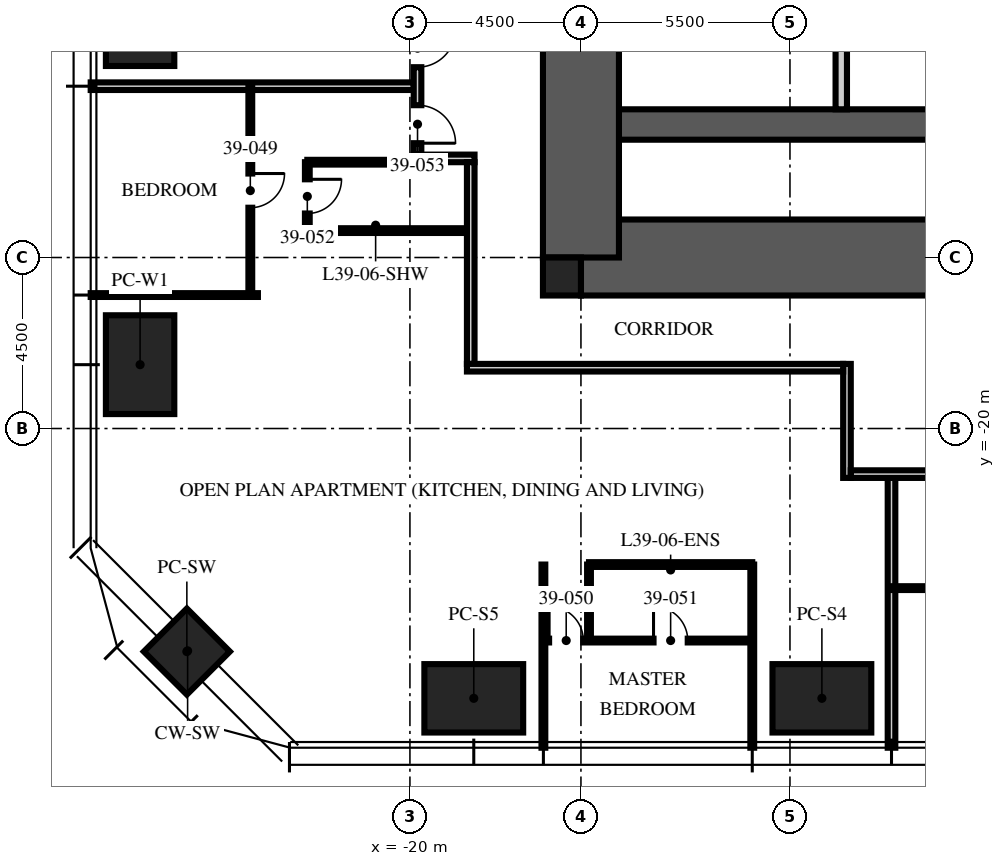
"""IFC4 building model, lengths in metres.
Left out: names, types, materials, properties, quantities, classifications, styles, units other than length and angle.
Written with IfcOpenShell. Run it as: python <this file> out.ifc"""

import sys

from ifc_helpers import new_model, si_unit, direction, frame, frame_2d, origin, origin_2d, place, context, subcontext, project, spatial, rectangle, extrude, element, fill, save


model = new_model("IFC4")
c1 = context("Model", 3, precision=1e-05, world=origin(), true_north=direction((0.0, 1.0)))
c2 = subcontext(c1, "Body", "Model", "MODEL_VIEW")
j1 = project(units=[si_unit("LENGTHUNIT", "METRE"), si_unit("PLANEANGLEUNIT", "RADIAN")], contexts=[c1])
p1 = place(None, origin())
s1 = spatial("IfcSite", under=j1, at=p1, CompositionType="ELEMENT")
p2 = place(p1, origin())
s2 = spatial("IfcBuilding", under=s1, at=p2, CompositionType="ELEMENT")
p3 = place(p2, frame((0.0, 0.0, 156.0)))
s3 = spatial("IfcBuildingStorey", under=s2, at=p3, CompositionType="ELEMENT", Elevation=156.0)
p4 = place(p3, frame((-15.5, -15.5, -0.25), z_axis=(0.0, 0.0, 1.0), x_axis=(1.0, 0.0, 0.0)))
e1 = element("IfcWall", 1, at=p4, inside=s3, PredefinedType="SHEAR", context=c2, shape_type="SweptSolid", body=[
    extrude(rectangle(XDim=31.0, YDim=2.0, at=frame_2d((15.5, 0.0))), origin(), (0.0, 0.0, 1.0), 3.75),
])
p5 = place(p4, frame((10.4, 0.0, 0.25)))
e2 = element("IfcOpeningElement", 2, at=p5, cuts=e1, PredefinedType="OPENING", context=c2, shape_type="SweptSolid", body=[
    extrude(rectangle(XDim=1.1, YDim=2.1, at=frame_2d((0.55, 1.05))), frame((0.0, 1.01, 0.0), z_axis=(0.0, -1.0, 0.0), x_axis=(1.0, 0.0, 0.0)), (0.0, 0.0, 1.0), 2.02),
])
p6 = place(p4, frame((13.5, 0.0, 0.25)))
e3 = element("IfcOpeningElement", 3, at=p6, cuts=e1, PredefinedType="OPENING", context=c2, shape_type="SweptSolid", body=[
    extrude(rectangle(XDim=1.1, YDim=2.1, at=frame_2d((0.55, 1.05))), frame((0.0, 1.01, 0.0), z_axis=(0.0, -1.0, 0.0), x_axis=(1.0, 0.0, 0.0)), (0.0, 0.0, 1.0), 2.02),
])
p7 = place(p4, frame((16.6, 0.0, 0.25)))
e4 = element("IfcOpeningElement", 4, at=p7, cuts=e1, PredefinedType="OPENING", context=c2, shape_type="SweptSolid", body=[
    extrude(rectangle(XDim=1.1, YDim=2.1, at=frame_2d((0.55, 1.05))), frame((0.0, 1.01, 0.0), z_axis=(0.0, -1.0, 0.0), x_axis=(1.0, 0.0, 0.0)), (0.0, 0.0, 1.0), 2.02),
])
p8 = place(p3, frame((-15.5, -12.0, -0.25), z_axis=(0.0, 0.0, 1.0), x_axis=(1.0, 0.0, 0.0)))
e5 = element("IfcWall", 5, at=p8, inside=s3, PredefinedType="SHEAR", context=c2, shape_type="SweptSolid", body=[
    extrude(rectangle(XDim=31.0, YDim=0.8, at=frame_2d((15.5, 0.0))), origin(), (0.0, 0.0, 1.0), 3.75),
])
p9 = place(p3, frame((-15.5, -15.5, -0.25), z_axis=(0.0, 0.0, 1.0), x_axis=(0.0, 1.0, 0.0)))
e6 = element("IfcWall", 6, at=p9, inside=s3, PredefinedType="SHEAR", context=c2, shape_type="SweptSolid", body=[
    extrude(rectangle(XDim=31.0, YDim=2.0, at=frame_2d((15.5, 0.0))), origin(), (0.0, 0.0, 1.0), 3.75),
])
p10 = place(p9, frame((6.5, 0.0, 0.25)))
e7 = element("IfcOpeningElement", 7, at=p10, cuts=e6, PredefinedType="OPENING", context=c2, shape_type="SweptSolid", body=[
    extrude(rectangle(XDim=1.2, YDim=2.1, at=frame_2d((0.6, 1.05))), frame((0.0, 1.01, 0.0), z_axis=(0.0, -1.0, 0.0), x_axis=(1.0, 0.0, 0.0)), (0.0, 0.0, 1.0), 2.02),
])
p11 = place(p9, frame((23.0, 0.0, 0.25)))
e8 = element("IfcOpeningElement", 8, at=p11, cuts=e6, PredefinedType="OPENING", context=c2, shape_type="SweptSolid", body=[
    extrude(rectangle(XDim=1.8, YDim=2.1, at=frame_2d((0.9, 1.05))), frame((0.0, 1.01, 0.0), z_axis=(0.0, -1.0, 0.0), x_axis=(1.0, 0.0, 0.0)), (0.0, 0.0, 1.0), 2.02),
])
p12 = place(p3, frame((-16.0, -16.0, -0.25), z_axis=(0.0, 0.0, 1.0), x_axis=(1.0, 0.0, 0.0)))
e9 = element("IfcColumn", 9, at=p12, inside=s3, PredefinedType="COLUMN", context=c2, shape_type="SweptSolid", body=[
    extrude(rectangle(XDim=1.0, YDim=1.0, at=origin_2d()), origin(), (0.0, 0.0, 1.0), 3.75),
])
for number, where, z_axis, x_axis in (
    (10, (-9.16, -27.1, 0.0), (0.0, 0.0, 1.0), (1.0, 0.0, 0.0)),
    (11, (-18.32, -27.1, 0.0), (0.0, 0.0, 1.0), (1.0, 0.0, 0.0)),
    (12, (-27.1, -18.32, 0.0), (0.0, 0.0, 1.0), (0.0, 1.0, 0.0)),
    (13, (-27.1, -9.16, 0.0), (0.0, 0.0, 1.0), (0.0, 1.0, 0.0)),
):
    element("IfcColumn", number, at=place(p3, frame(where, z_axis=z_axis, x_axis=x_axis)), inside=s3, PredefinedType="COLUMN", context=c2, shape_type="SweptSolid", body=[
        extrude(rectangle(XDim=2.6, YDim=1.8, at=origin_2d()), origin(), (0.0, 0.0, 1.0), 3.75),
    ])
p13 = place(p3, frame((-25.87, -25.87, 0.0), z_axis=(0.0, 0.0, 1.0), x_axis=(0.707106781187, -0.707106781187, 0.0)))
e14 = element("IfcColumn", 14, at=p13, inside=s3, PredefinedType="COLUMN", context=c2, shape_type="SweptSolid", body=[
    extrude(rectangle(XDim=1.6, YDim=1.6, at=origin_2d()), origin(), (0.0, 0.0, 1.0), 3.75),
])
p14 = place(p3, frame((-8.65, -11.6, 0.0), z_axis=(0.0, 0.0, 1.0), x_axis=(0.0, 1.0, 0.0)))
e15 = element("IfcWall", 15, at=p14, inside=s3, PredefinedType="PARTITIONING", context=c2, shape_type="SweptSolid", body=[
    extrude(rectangle(XDim=6.7, YDim=0.3, at=frame_2d((3.35, 0.0))), origin(), (0.0, 0.0, 1.0), 3.5),
])
p15 = place(p14, frame((2.85, 0.0, 0.0)))
e16 = element("IfcOpeningElement", 16, at=p15, cuts=e15, PredefinedType="OPENING", context=c2, shape_type="SweptSolid", body=[
    extrude(rectangle(XDim=1.1, YDim=2.1, at=frame_2d((0.55, 1.05))), frame((0.0, 0.16, 0.0), z_axis=(0.0, -1.0, 0.0), x_axis=(1.0, 0.0, 0.0)), (0.0, 0.0, 1.0), 0.32),
])
p16 = place(p3, frame((-19.9, -10.992, 0.0), z_axis=(0.0, 0.0, 1.0), x_axis=(-1.0, 0.0, 0.0)))
e17 = element("IfcWall", 17, at=p16, inside=s3, PredefinedType="PARTITIONING", context=c2, shape_type="SweptSolid", body=[
    extrude(rectangle(XDim=8.5, YDim=0.2, at=frame_2d((4.25, 0.0))), origin(), (0.0, 0.0, 1.0), 2.81),
])
p17 = place(p3, frame((-24.0, -16.488, 0.0), z_axis=(0.0, 0.0, 1.0), x_axis=(-1.0, 0.0, 0.0)))
e18 = element("IfcWall", 18, at=p17, inside=s3, PredefinedType="PARTITIONING", context=c2, shape_type="SweptSolid", body=[
    extrude(rectangle(XDim=4.4, YDim=0.1, at=frame_2d((2.2, 0.0))), origin(), (0.0, 0.0, 1.0), 2.81),
])
for number, where, z_axis, x_axis in (
    (19, (-16.488, -23.58, 0.0), (0.0, 0.0, 1.0), (0.0, -1.0, 0.0)),
    (20, (-10.992, -23.58, 0.0), (0.0, 0.0, 1.0), (0.0, -1.0, 0.0)),
):
    element("IfcWall", number, at=place(p3, frame(where, z_axis=z_axis, x_axis=x_axis)), inside=s3, PredefinedType="PARTITIONING", context=c2, shape_type="SweptSolid", body=[
        extrude(rectangle(XDim=4.82, YDim=0.1, at=frame_2d((2.41, 0.0))), origin(), (0.0, 0.0, 1.0), 2.81),
    ])
p18 = place(p3, frame((-7.328, -21.3, 0.0), z_axis=(0.0, 0.0, 1.0), x_axis=(0.0, -1.0, 0.0)))
e21 = element("IfcWall", 21, at=p18, inside=s3, PredefinedType="PARTITIONING", context=c2, shape_type="SweptSolid", body=[
    extrude(rectangle(XDim=7.1, YDim=0.2, at=frame_2d((3.55, 0.0))), origin(), (0.0, 0.0, 1.0), 2.81),
])
p19 = place(p3, frame((-24.2, -10.992, 0.0), z_axis=(0.0, 0.0, 1.0), x_axis=(0.0, -1.0, 0.0)))
e22 = element("IfcWall", 22, at=p19, inside=s3, PredefinedType="PARTITIONING", context=c2, shape_type="SweptSolid", body=[
    extrude(rectangle(XDim=5.496, YDim=0.1, at=frame_2d((2.748, 0.0))), origin(), (0.0, 0.0, 1.0), 2.81),
])
p20 = place(p19, frame((2.298, 0.0, 0.0)))
e23 = element("IfcOpeningElement", 23, at=p20, cuts=e22, PredefinedType="OPENING", context=c2, shape_type="SweptSolid", body=[
    extrude(rectangle(XDim=0.9, YDim=2.1, at=frame_2d((0.45, 1.05))), frame((0.0, 0.06, 0.0), z_axis=(0.0, -1.0, 0.0), x_axis=(1.0, 0.0, 0.0)), (0.0, 0.0, 1.0), 0.12),
])
p21 = place(p3, frame((-16.488, -25.58, 0.0), z_axis=(0.0, 0.0, 1.0), x_axis=(1.0, 0.0, 0.0)))
e24 = element("IfcWall", 24, at=p21, inside=s3, PredefinedType="PARTITIONING", context=c2, shape_type="SweptSolid", body=[
    extrude(rectangle(XDim=5.496, YDim=0.1, at=frame_2d((2.748, 0.0))), origin(), (0.0, 0.0, 1.0), 2.81),
])
p22 = place(p21, frame((0.15, 0.0, 0.0)))
e25 = element("IfcOpeningElement", 25, at=p22, cuts=e24, PredefinedType="OPENING", context=c2, shape_type="SweptSolid", body=[
    extrude(rectangle(XDim=0.9, YDim=2.1, at=frame_2d((0.45, 1.05))), frame((0.0, 0.06, 0.0), z_axis=(0.0, -1.0, 0.0), x_axis=(1.0, 0.0, 0.0)), (0.0, 0.0, 1.0), 0.12),
])
p23 = place(p21, frame((2.898, 0.0, 0.0)))
e26 = element("IfcOpeningElement", 26, at=p23, cuts=e24, PredefinedType="OPENING", context=c2, shape_type="SweptSolid", body=[
    extrude(rectangle(XDim=0.9, YDim=2.1, at=frame_2d((0.45, 1.05))), frame((0.0, 0.06, 0.0), z_axis=(0.0, -1.0, 0.0), x_axis=(1.0, 0.0, 0.0)), (0.0, 0.0, 1.0), 0.12),
])
p24 = place(p3, frame((-15.288, -23.58, 0.0), z_axis=(0.0, 0.0, 1.0), x_axis=(0.0, -1.0, 0.0)))
e27 = element("IfcWall", 27, at=p24, inside=s3, PredefinedType="PARTITIONING", context=c2, shape_type="SweptSolid", body=[
    extrude(rectangle(XDim=2.0, YDim=0.1, at=frame_2d((1.0, 0.0))), origin(), (0.0, 0.0, 1.0), 3.5),
])
p25 = place(p3, frame((-15.288, -23.58, 0.0), z_axis=(0.0, 0.0, 1.0), x_axis=(1.0, 0.0, 0.0)))
e28 = element("IfcWall", 28, at=p25, inside=s3, PredefinedType="PARTITIONING", context=c2, shape_type="SweptSolid", body=[
    extrude(rectangle(XDim=4.296, YDim=0.125, at=frame_2d((2.148, 0.0))), origin(), (0.0, 0.0, 1.0), 2.81),
])
p26 = place(p3, frame((-22.7, -12.992, 0.0), z_axis=(0.0, 0.0, 1.0), x_axis=(0.0, -1.0, 0.0)))
e29 = element("IfcWall", 29, at=p26, inside=s3, PredefinedType="PARTITIONING", context=c2, shape_type="SweptSolid", body=[
    extrude(rectangle(XDim=1.8, YDim=0.125, at=frame_2d((0.9, 0.0))), origin(), (0.0, 0.0, 1.0), 2.81),
])
p27 = place(p26, frame((0.45, 0.0, 0.0)))
e30 = element("IfcOpeningElement", 30, at=p27, cuts=e29, PredefinedType="OPENING", context=c2, shape_type="SweptSolid", body=[
    extrude(rectangle(XDim=0.9, YDim=2.1, at=frame_2d((0.45, 1.05))), frame((0.0, 0.073, 0.0), z_axis=(0.0, -1.0, 0.0), x_axis=(1.0, 0.0, 0.0)), (0.0, 0.0, 1.0), 0.145),
])
p28 = place(p3, frame((-19.97, -12.992, 0.0), z_axis=(0.0, 0.0, 1.0), x_axis=(-1.0, 0.0, 0.0)))
e31 = element("IfcWall", 31, at=p28, inside=s3, PredefinedType="PARTITIONING", context=c2, shape_type="SweptSolid", body=[
    extrude(rectangle(XDim=2.73, YDim=0.125, at=frame_2d((1.365, 0.0))), origin(), (0.0, 0.0, 1.0), 3.5),
])
p29 = place(p3, frame((-18.5, -14.792, 0.0), z_axis=(0.0, 0.0, 1.0), x_axis=(-1.0, 0.0, 0.0)))
e32 = element("IfcWall", 32, at=p29, inside=s3, PredefinedType="PARTITIONING", context=c2, shape_type="SweptSolid", body=[
    extrude(rectangle(XDim=4.2, YDim=0.125, at=frame_2d((2.1, 0.0))), origin(), (0.0, 0.0, 1.0), 3.5),
])
p30 = place(p3, frame((-7.328, -24.2, 0.0), z_axis=(0.0, 0.0, 1.0), x_axis=(1.0, 0.0, 0.0)))
e33 = element("IfcWall", 33, at=p30, inside=s3, PredefinedType="PARTITIONING", context=c2, shape_type="SweptSolid", body=[
    extrude(rectangle(XDim=5.496, YDim=0.1, at=frame_2d((2.748, 0.0))), origin(), (0.0, 0.0, 1.0), 2.81),
])
p31 = place(p30, frame((2.298, 0.0, 0.0)))
e34 = element("IfcOpeningElement", 34, at=p31, cuts=e33, PredefinedType="OPENING", context=c2, shape_type="SweptSolid", body=[
    extrude(rectangle(XDim=0.9, YDim=2.1, at=frame_2d((0.45, 1.05))), frame((0.0, 0.06, 0.0), z_axis=(0.0, -1.0, 0.0), x_axis=(1.0, 0.0, 0.0)), (0.0, 0.0, 1.0), 0.12),
])
p32 = place(p3, frame((-18.3, -12.892, 0.0), z_axis=(0.0, 0.0, 1.0), x_axis=(-1.0, 0.0, 0.0)))
e35 = element("IfcWall", 35, at=p32, inside=s3, PredefinedType="PARTITIONING", context=c2, shape_type="SweptSolid", body=[
    extrude(rectangle(XDim=1.6, YDim=0.2, at=frame_2d((0.8, 0.0))), origin(), (0.0, 0.0, 1.0), 3.5),
])
p33 = place(p3, frame((-19.8, -9.192, 0.0), z_axis=(0.0, 0.0, 1.0), x_axis=(0.0, -1.0, 0.0)))
e36 = element("IfcWall", 36, at=p33, inside=s3, PredefinedType="PARTITIONING", context=c2, shape_type="SweptSolid", body=[
    extrude(rectangle(XDim=3.6, YDim=0.2, at=frame_2d((1.8, 0.0))), origin(), (0.0, 0.0, 1.0), 2.7),
])
p34 = place(p33, frame((0.3, 0.0, 0.0)))
e37 = element("IfcOpeningElement", 37, at=p34, cuts=e36, PredefinedType="OPENING", context=c2, shape_type="SweptSolid", body=[
    extrude(rectangle(XDim=1.0, YDim=2.2, at=frame_2d((0.5, 1.1))), frame((0.0, 0.11, 0.0), z_axis=(0.0, -1.0, 0.0), x_axis=(1.0, 0.0, 0.0)), (0.0, 0.0, 1.0), 0.22),
])
p35 = place(p33, frame((2.3, 0.0, 0.0)))
e38 = element("IfcOpeningElement", 38, at=p35, cuts=e36, PredefinedType="OPENING", context=c2, shape_type="SweptSolid", body=[
    extrude(rectangle(XDim=1.0, YDim=2.2, at=frame_2d((0.5, 1.1))), frame((0.0, 0.11, 0.0), z_axis=(0.0, -1.0, 0.0), x_axis=(1.0, 0.0, 0.0)), (0.0, 0.0, 1.0), 0.22),
])
p36 = place(p3, frame((-18.4, -12.992, 0.0), z_axis=(0.0, 0.0, 1.0), x_axis=(0.0, -1.0, 0.0)))
e39 = element("IfcWall", 39, at=p36, inside=s3, PredefinedType="PARTITIONING", context=c2, shape_type="SweptSolid", body=[
    extrude(rectangle(XDim=5.308, YDim=0.2, at=frame_2d((2.654, 0.0))), origin(), (0.0, 0.0, 1.0), 2.3),
])
p37 = place(p3, frame((-8.5, -18.3, 0.0), z_axis=(0.0, 0.0, 1.0), x_axis=(0.0, -1.0, 0.0)))
e40 = element("IfcWall", 40, at=p37, inside=s3, PredefinedType="PARTITIONING", context=c2, shape_type="SweptSolid", body=[
    extrude(rectangle(XDim=3.0, YDim=0.2, at=frame_2d((1.5, 0.0))), origin(), (0.0, 0.0, 1.0), 3.5),
])
p38 = place(p3, frame((5.4, -21.2, 0.0), z_axis=(0.0, 0.0, 1.0), x_axis=(-1.0, 0.0, 0.0)))
e41 = element("IfcWall", 41, at=p38, inside=s3, PredefinedType="PARTITIONING", context=c2, shape_type="SweptSolid", body=[
    extrude(rectangle(XDim=13.8, YDim=0.2, at=frame_2d((6.9, 0.0))), origin(), (0.0, 0.0, 1.0), 2.7),
])
p39 = place(p3, frame((-8.6, -18.4, 0.0), z_axis=(0.0, 0.0, 1.0), x_axis=(-1.0, 0.0, 0.0)))
e42 = element("IfcWall", 42, at=p39, inside=s3, PredefinedType="PARTITIONING", context=c2, shape_type="SweptSolid", body=[
    extrude(rectangle(XDim=9.9, YDim=0.2, at=frame_2d((4.95, 0.0))), origin(), (0.0, 0.0, 1.0), 2.3),
])
p40 = place(p34, origin())
e43 = element("IfcDoor", 43, at=p40, inside=s3, OperationType="SINGLE_SWING_LEFT", PredefinedType="DOOR", context=c2, shape_type="SweptSolid", body=[
    extrude(rectangle(XDim=1.0, YDim=2.2, at=frame_2d((0.5, 1.1))), frame((0.0, 0.025, 0.0), z_axis=(0.0, -1.0, 0.0), x_axis=(1.0, 0.0, 0.0)), (0.0, 0.0, 1.0), 0.05),
])
fill(e37, e43)
p41 = place(p20, origin())
e44 = element("IfcDoor", 44, at=p41, inside=s3, OperationType="SINGLE_SWING_LEFT", PredefinedType="DOOR", context=c2, shape_type="SweptSolid", body=[
    extrude(rectangle(XDim=0.9, YDim=2.1, at=frame_2d((0.45, 1.05))), frame((0.0, 0.025, 0.0), z_axis=(0.0, -1.0, 0.0), x_axis=(1.0, 0.0, 0.0)), (0.0, 0.0, 1.0), 0.05),
])
fill(e23, e44)
p42 = place(p22, origin())
e45 = element("IfcDoor", 45, at=p42, inside=s3, OperationType="SINGLE_SWING_LEFT", PredefinedType="DOOR", context=c2, shape_type="SweptSolid", body=[
    extrude(rectangle(XDim=0.9, YDim=2.1, at=frame_2d((0.45, 1.05))), frame((0.0, 0.025, 0.0), z_axis=(0.0, -1.0, 0.0), x_axis=(1.0, 0.0, 0.0)), (0.0, 0.0, 1.0), 0.05),
])
fill(e25, e45)
p43 = place(p23, origin())
e46 = element("IfcDoor", 46, at=p43, inside=s3, OperationType="SINGLE_SWING_LEFT", PredefinedType="DOOR", context=c2, shape_type="SweptSolid", body=[
    extrude(rectangle(XDim=0.9, YDim=2.1, at=frame_2d((0.45, 1.05))), frame((0.0, 0.025, 0.0), z_axis=(0.0, -1.0, 0.0), x_axis=(1.0, 0.0, 0.0)), (0.0, 0.0, 1.0), 0.05),
])
fill(e26, e46)
p44 = place(p27, origin())
e47 = element("IfcDoor", 47, at=p44, inside=s3, OperationType="SINGLE_SWING_LEFT", PredefinedType="DOOR", context=c2, shape_type="SweptSolid", body=[
    extrude(rectangle(XDim=0.9, YDim=2.1, at=frame_2d((0.45, 1.05))), frame((0.0, 0.025, 0.0), z_axis=(0.0, -1.0, 0.0), x_axis=(1.0, 0.0, 0.0)), (0.0, 0.0, 1.0), 0.05),
])
fill(e30, e47)
p45 = place(p35, origin())
e48 = element("IfcDoor", 48, at=p45, inside=s3, OperationType="SINGLE_SWING_RIGHT", PredefinedType="DOOR", context=c2, shape_type="SweptSolid", body=[
    extrude(rectangle(XDim=1.0, YDim=2.2, at=frame_2d((0.5, 1.1))), frame((0.0, 0.025, 0.0), z_axis=(0.0, -1.0, 0.0), x_axis=(1.0, 0.0, 0.0)), (0.0, 0.0, 1.0), 0.05),
])
fill(e38, e48)
save(model, sys.argv[1])
